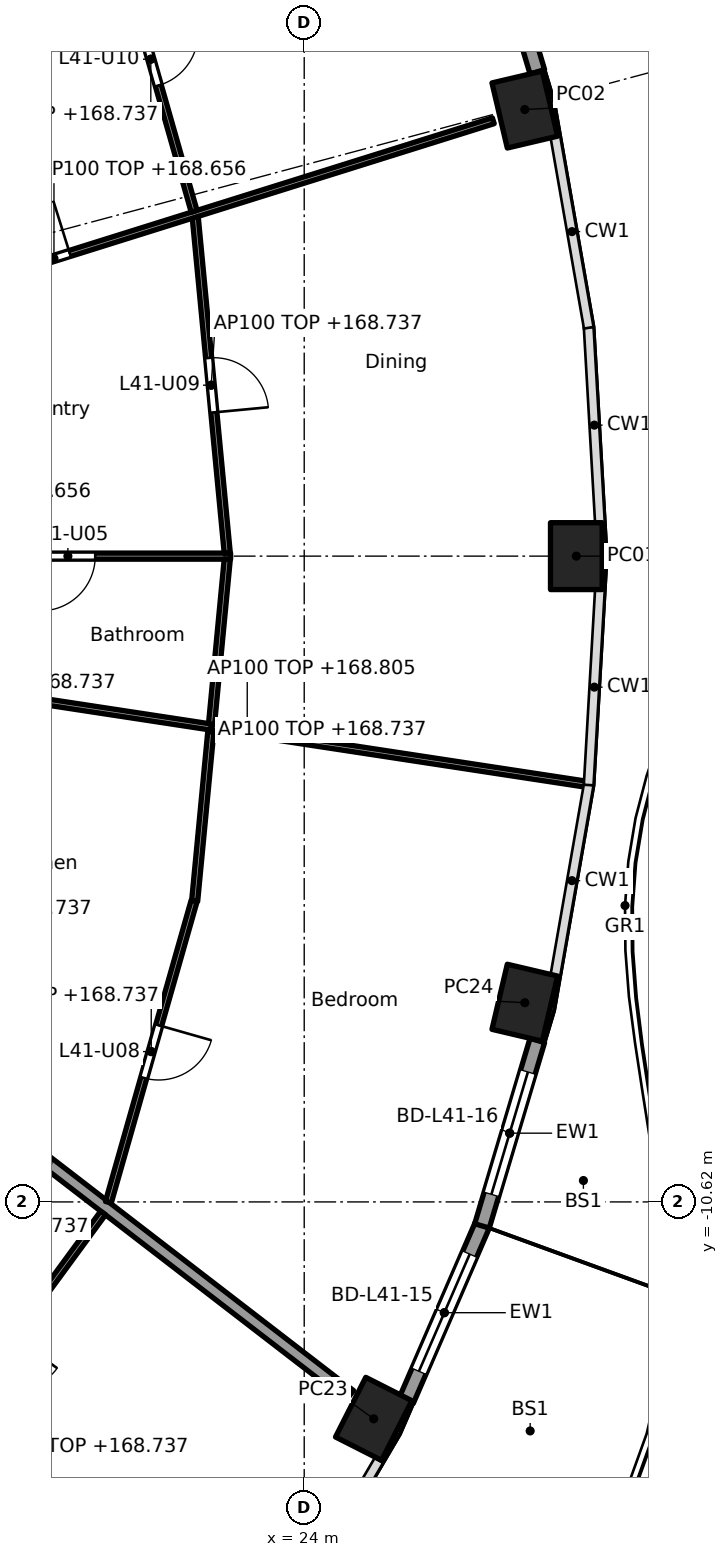
"""IFC4 building model, lengths in metres.
Left out: names, types, materials, properties, quantities, classifications, styles, units other than length and angle.
Written with IfcOpenShell. Run it as: python <this file> out.ifc"""

import sys

from ifc_helpers import new_model, si_unit, direction, frame, frame_2d, origin, origin_2d, place, context, subcontext, project, spatial, rectangle, hollow_rectangle, extrude, element, fill, save


model = new_model("IFC4")
c1 = context("Model", 3, precision=1e-05, world=origin(), true_north=direction((0.0, 1.0)))
c2 = subcontext(c1, "Body", "Model", "MODEL_VIEW")
j1 = project(units=[si_unit("LENGTHUNIT", "METRE"), si_unit("PLANEANGLEUNIT", "RADIAN")], contexts=[c1])
p1 = place(None, origin())
s1 = spatial("IfcSite", under=j1, at=p1, CompositionType="ELEMENT")
p2 = place(p1, origin())
s2 = spatial("IfcBuilding", under=s1, at=p2, CompositionType="ELEMENT")
p3 = place(p2, frame((0.0, 0.0, 165.9)))
s3 = spatial("IfcBuildingStorey", under=s2, at=p3, CompositionType="ELEMENT", Elevation=165.9)
for number, where, z_axis, x_axis in (
    (1, (28.475, 0.0, -0.26), (0.0, 0.0, 1.0), (0.0, 1.0, 0.0)),
    (2, (27.627, 7.344, -0.26), (0.0, 0.0, 1.0), (-0.229, 0.973, 0.0)),
    (3, (25.142, -14.188, -0.26), (0.0, 0.0, 1.0), (0.452, 0.892, 0.0)),
    (4, (27.627, -7.344, -0.26), (0.0, 0.0, 1.0), (0.229, 0.973, 0.0)),
):
    element("IfcColumn", number, at=place(p3, frame(where, z_axis=z_axis, x_axis=x_axis)), inside=s3, PredefinedType="COLUMN", context=c2, shape_type="SweptSolid", body=[
        extrude(hollow_rectangle(XDim=1.1, YDim=0.85, WallThickness=0.036, at=origin_2d()), origin(), (0.0, 0.0, 1.0), 3.96),
    ])
p4 = place(p3, frame((26.924, 11.014, 0.0), z_axis=(0.0, 0.0, 1.0), x_axis=(0.28584838049, -0.958274857946, 0.0)))
e5 = element("IfcWall", 5, at=p4, inside=s3, PredefinedType="SOLIDWALL", context=c2, shape_type="SweptSolid", body=[
    extrude(rectangle(XDim=3.182, YDim=0.25, at=frame_2d((1.591, 0.0))), origin(), (0.0, 0.0, 1.0), 3.44),
])
p5 = place(p4, frame((0.541, 0.0, 0.0)))
e6 = element("IfcOpeningElement", 6, at=p5, cuts=e5, PredefinedType="OPENING", context=c2, shape_type="SweptSolid", body=[
    extrude(rectangle(XDim=2.1, YDim=2.4, at=frame_2d((1.05, 1.2))), frame((0.0, 0.135, 0.0), z_axis=(0.0, -1.0, 0.0), x_axis=(1.0, 0.0, 0.0)), (0.0, 0.0, 1.0), 0.27),
])
p6 = place(p3, frame((26.929, -11.0, 0.0), z_axis=(0.0, 0.0, 1.0), x_axis=(-0.397620521824, -0.917549955384, 0.0)))
e7 = element("IfcWall", 7, at=p6, inside=s3, PredefinedType="SOLIDWALL", context=c2, shape_type="SweptSolid", body=[
    extrude(rectangle(XDim=3.142, YDim=0.25, at=frame_2d((1.571, 0.0))), origin(), (0.0, 0.0, 1.0), 3.44),
])
p7 = place(p6, frame((0.521, 0.0, 0.0)))
e8 = element("IfcOpeningElement", 8, at=p7, cuts=e7, PredefinedType="OPENING", context=c2, shape_type="SweptSolid", body=[
    extrude(rectangle(XDim=2.1, YDim=2.4, at=frame_2d((1.05, 1.2))), frame((0.0, 0.135, 0.0), z_axis=(0.0, -1.0, 0.0), x_axis=(1.0, 0.0, 0.0)), (0.0, 0.0, 1.0), 0.27),
])
p8 = place(p3, frame((27.833, -7.965, 0.0), z_axis=(0.0, 0.0, 1.0), x_axis=(-0.28584838049, -0.958274857946, 0.0)))
e9 = element("IfcWall", 9, at=p8, inside=s3, PredefinedType="SOLIDWALL", context=c2, shape_type="SweptSolid", body=[
    extrude(rectangle(XDim=3.182, YDim=0.25, at=frame_2d((1.591, 0.0))), origin(), (0.0, 0.0, 1.0), 3.44),
])
p9 = place(p8, frame((0.541, 0.0, 0.0)))
e10 = element("IfcOpeningElement", 10, at=p9, cuts=e9, PredefinedType="OPENING", context=c2, shape_type="SweptSolid", body=[
    extrude(rectangle(XDim=2.1, YDim=2.4, at=frame_2d((1.05, 1.2))), frame((0.0, 0.135, 0.0), z_axis=(0.0, -1.0, 0.0), x_axis=(1.0, 0.0, 0.0)), (0.0, 0.0, 1.0), 0.27),
])
p10 = place(p3, frame((14.822, -6.154, 0.0), z_axis=(0.0, 0.0, 1.0), x_axis=(0.792203056092, -0.610257583254, 0.0)))
e11 = element("IfcWall", 11, at=p10, inside=s3, PredefinedType="PARTITIONING", context=c2, shape_type="SweptSolid", body=[
    extrude(rectangle(XDim=12.533, YDim=0.2, at=frame_2d((6.266, 0.0))), origin(), (0.0, 0.0, 1.0), 2.837),
])
p11 = place(p3, frame((12.665, 0.0, 0.0), z_axis=(0.0, 0.0, 1.0), x_axis=(1.0, 0.0, 0.0)))
e12 = element("IfcWall", 12, at=p11, inside=s3, PredefinedType="PARTITIONING", context=c2, shape_type="SweptSolid", body=[
    extrude(rectangle(XDim=10.124, YDim=0.1, at=frame_2d((5.062, 0.0))), origin(), (0.0, 0.0, 1.0), 2.756),
])
p12 = place(p11, frame((1.961, 0.0, 0.0)))
e13 = element("IfcOpeningElement", 13, at=p12, cuts=e12, PredefinedType="OPENING", context=c2, shape_type="SweptSolid", body=[
    extrude(rectangle(XDim=0.9, YDim=2.1, at=frame_2d((0.45, 1.05))), frame((0.0, 0.06, 0.0), z_axis=(0.0, -1.0, 0.0), x_axis=(1.0, 0.0, 0.0)), (0.0, 0.0, 1.0), 0.12),
])
p13 = place(p11, frame((6.999, 0.0, 0.0)))
e14 = element("IfcOpeningElement", 14, at=p13, cuts=e12, PredefinedType="OPENING", context=c2, shape_type="SweptSolid", body=[
    extrude(rectangle(XDim=0.9, YDim=2.1, at=frame_2d((0.45, 1.05))), frame((0.0, 0.06, 0.0), z_axis=(0.0, -1.0, 0.0), x_axis=(1.0, 0.0, 0.0)), (0.0, 0.0, 1.0), 0.12),
])
p14 = place(p3, frame((22.734, 0.05, 0.0), z_axis=(0.0, 0.0, 1.0), x_axis=(-0.094923312677, 0.995484587882, 0.0)))
e15 = element("IfcWall", 15, at=p14, inside=s3, PredefinedType="PARTITIONING", context=c2, shape_type="SweptSolid", body=[
    extrude(rectangle(XDim=5.548, YDim=0.1, at=frame_2d((2.774, 0.0))), origin(), (0.0, 0.0, 1.0), 2.837),
])
p15 = place(p14, frame((2.324, 0.0, 0.0)))
e16 = element("IfcOpeningElement", 16, at=p15, cuts=e15, PredefinedType="OPENING", context=c2, shape_type="SweptSolid", body=[
    extrude(rectangle(XDim=0.9, YDim=2.1, at=frame_2d((0.45, 1.05))), frame((0.0, 0.06, 0.0), z_axis=(0.0, -1.0, 0.0), x_axis=(1.0, 0.0, 0.0)), (0.0, 0.0, 1.0), 0.12),
])
p16 = place(p3, frame((22.734, -0.05, 0.0), z_axis=(0.0, 0.0, 1.0), x_axis=(-0.0949274088, -0.995484197292, 0.0)))
e17 = element("IfcWall", 17, at=p16, inside=s3, PredefinedType="PARTITIONING", context=c2, shape_type="SweptSolid", body=[
    extrude(rectangle(XDim=5.648, YDim=0.1, at=frame_2d((2.824, 0.0))), origin(), (0.0, 0.0, 1.0), 2.837),
])
p17 = place(p3, frame((12.66, 2.632, 0.0), z_axis=(0.0, 0.0, 1.0), x_axis=(0.954248738607, 0.299013954302, 0.0)))
e18 = element("IfcWall", 18, at=p17, inside=s3, PredefinedType="PARTITIONING", context=c2, shape_type="SweptSolid", body=[
    extrude(rectangle(XDim=15.142, YDim=0.1, at=frame_2d((7.571, 0.0))), origin(), (0.0, 0.0, 1.0), 2.756),
])
p18 = place(p17, frame((0.669, 0.0, 0.0)))
e19 = element("IfcOpeningElement", 19, at=p18, cuts=e18, PredefinedType="OPENING", context=c2, shape_type="SweptSolid", body=[
    extrude(rectangle(XDim=0.9, YDim=2.1, at=frame_2d((0.45, 1.05))), frame((0.0, 0.06, 0.0), z_axis=(0.0, -1.0, 0.0), x_axis=(1.0, 0.0, 0.0)), (0.0, 0.0, 1.0), 0.12),
])
p19 = place(p17, frame((6.944, 0.0, 0.0)))
e20 = element("IfcOpeningElement", 20, at=p19, cuts=e18, PredefinedType="OPENING", context=c2, shape_type="SweptSolid", body=[
    extrude(rectangle(XDim=0.9, YDim=2.1, at=frame_2d((0.45, 1.05))), frame((0.0, 0.06, 0.0), z_axis=(0.0, -1.0, 0.0), x_axis=(1.0, 0.0, 0.0)), (0.0, 0.0, 1.0), 0.12),
])
p20 = place(p3, frame((22.189, 5.67, 0.0), z_axis=(0.0, 0.0, 1.0), x_axis=(-0.273815967041, 0.961782104322, 0.0)))
e21 = element("IfcWall", 21, at=p20, inside=s3, PredefinedType="PARTITIONING", context=c2, shape_type="SweptSolid", body=[
    extrude(rectangle(XDim=5.202, YDim=0.1, at=frame_2d((2.601, 0.0))), origin(), (0.0, 0.0, 1.0), 2.837),
])
p21 = place(p20, frame((2.151, 0.0, 0.0)))
e22 = element("IfcOpeningElement", 22, at=p21, cuts=e21, PredefinedType="OPENING", context=c2, shape_type="SweptSolid", body=[
    extrude(rectangle(XDim=0.9, YDim=2.1, at=frame_2d((0.45, 1.05))), frame((0.0, 0.06, 0.0), z_axis=(0.0, -1.0, 0.0), x_axis=(1.0, 0.0, 0.0)), (0.0, 0.0, 1.0), 0.12),
])
p22 = place(p3, frame((17.169, -15.609, 0.0), z_axis=(0.0, 0.0, 1.0), x_axis=(0.591122127251, 0.806582066918, 0.0)))
e23 = element("IfcWall", 23, at=p22, inside=s3, PredefinedType="PARTITIONING", context=c2, shape_type="SweptSolid", body=[
    extrude(rectangle(XDim=5.96, YDim=0.1, at=frame_2d((2.98, 0.0))), origin(), (0.0, 0.0, 1.0), 2.837),
])
p23 = place(p22, frame((2.555, 0.0, 0.0)))
e24 = element("IfcOpeningElement", 24, at=p23, cuts=e23, PredefinedType="OPENING", context=c2, shape_type="SweptSolid", body=[
    extrude(rectangle(XDim=0.9, YDim=2.1, at=frame_2d((0.45, 1.05))), frame((0.0, 0.06, 0.0), z_axis=(0.0, -1.0, 0.0), x_axis=(1.0, 0.0, 0.0)), (0.0, 0.0, 1.0), 0.12),
])
p24 = place(p3, frame((20.779, -10.625, 0.0), z_axis=(0.0, 0.0, 1.0), x_axis=(0.273819702124, 0.961781040949, 0.0)))
e25 = element("IfcWall", 25, at=p24, inside=s3, PredefinedType="PARTITIONING", context=c2, shape_type="SweptSolid", body=[
    extrude(rectangle(XDim=5.152, YDim=0.1, at=frame_2d((2.576, 0.0))), origin(), (0.0, 0.0, 1.0), 2.837),
])
p25 = place(p24, frame((2.126, 0.0, 0.0)))
e26 = element("IfcOpeningElement", 26, at=p25, cuts=e25, PredefinedType="OPENING", context=c2, shape_type="SweptSolid", body=[
    extrude(rectangle(XDim=0.9, YDim=2.1, at=frame_2d((0.45, 1.05))), frame((0.0, 0.06, 0.0), z_axis=(0.0, -1.0, 0.0), x_axis=(1.0, 0.0, 0.0)), (0.0, 0.0, 1.0), 0.12),
])
p26 = place(p3, frame((17.407, -2.039, 0.0), z_axis=(0.0, 0.0, 1.0), x_axis=(0.98858728603, -0.150649188184, 0.0)))
e27 = element("IfcWall", 27, at=p26, inside=s3, PredefinedType="PARTITIONING", context=c2, shape_type="SweptSolid", body=[
    extrude(rectangle(XDim=11.441, YDim=0.1, at=frame_2d((5.721, 0.0))), origin(), (0.0, 0.0, 1.0), 2.905),
])
p27 = place(p7, origin())
e28 = element("IfcDoor", 28, at=p27, inside=s3, OperationType="SLIDING_TO_LEFT", PredefinedType="DOOR", context=c2, shape_type="SweptSolid", body=[
    extrude(rectangle(XDim=2.1, YDim=2.4, at=frame_2d((1.05, 1.2))), frame((0.0, 0.025, 0.0), z_axis=(0.0, -1.0, 0.0), x_axis=(1.0, 0.0, 0.0)), (0.0, 0.0, 1.0), 0.05),
])
fill(e8, e28)
p28 = place(p9, origin())
e29 = element("IfcDoor", 29, at=p28, inside=s3, OperationType="SLIDING_TO_LEFT", PredefinedType="DOOR", context=c2, shape_type="SweptSolid", body=[
    extrude(rectangle(XDim=2.1, YDim=2.4, at=frame_2d((1.05, 1.2))), frame((0.0, 0.025, 0.0), z_axis=(0.0, -1.0, 0.0), x_axis=(1.0, 0.0, 0.0)), (0.0, 0.0, 1.0), 0.05),
])
fill(e10, e29)
p29 = place(p13, frame((0.9, 0.0, 0.0), x_axis=(-1.0, 0.0, 0.0)))
e30 = element("IfcDoor", 30, at=p29, inside=s3, OperationType="SINGLE_SWING_RIGHT", PredefinedType="DOOR", context=c2, shape_type="SweptSolid", body=[
    extrude(rectangle(XDim=0.9, YDim=2.1, at=frame_2d((0.45, 1.05))), frame((0.0, 0.025, 0.0), z_axis=(0.0, -1.0, 0.0), x_axis=(1.0, 0.0, 0.0)), (0.0, 0.0, 1.0), 0.05),
])
fill(e14, e30)
p30 = place(p19, origin())
e31 = element("IfcDoor", 31, at=p30, inside=s3, OperationType="SINGLE_SWING_RIGHT", PredefinedType="DOOR", context=c2, shape_type="SweptSolid", body=[
    extrude(rectangle(XDim=0.9, YDim=2.1, at=frame_2d((0.45, 1.05))), frame((0.0, 0.025, 0.0), z_axis=(0.0, -1.0, 0.0), x_axis=(1.0, 0.0, 0.0)), (0.0, 0.0, 1.0), 0.05),
])
fill(e20, e31)
p31 = place(p25, frame((0.9, 0.0, 0.0), x_axis=(-1.0, 0.0, 0.0)))
e32 = element("IfcDoor", 32, at=p31, inside=s3, OperationType="SINGLE_SWING_LEFT", PredefinedType="DOOR", context=c2, shape_type="SweptSolid", body=[
    extrude(rectangle(XDim=0.9, YDim=2.1, at=frame_2d((0.45, 1.05))), frame((0.0, 0.025, 0.0), z_axis=(0.0, -1.0, 0.0), x_axis=(1.0, 0.0, 0.0)), (0.0, 0.0, 1.0), 0.05),
])
fill(e26, e32)
p32 = place(p15, frame((0.9, 0.0, 0.0), x_axis=(-1.0, 0.0, 0.0)))
e33 = element("IfcDoor", 33, at=p32, inside=s3, OperationType="SINGLE_SWING_RIGHT", PredefinedType="DOOR", context=c2, shape_type="SweptSolid", body=[
    extrude(rectangle(XDim=0.9, YDim=2.1, at=frame_2d((0.45, 1.05))), frame((0.0, 0.025, 0.0), z_axis=(0.0, -1.0, 0.0), x_axis=(1.0, 0.0, 0.0)), (0.0, 0.0, 1.0), 0.05),
])
fill(e16, e33)
p33 = place(p21, frame((0.9, 0.0, 0.0), x_axis=(-1.0, 0.0, 0.0)))
e34 = element("IfcDoor", 34, at=p33, inside=s3, OperationType="SINGLE_SWING_LEFT", PredefinedType="DOOR", context=c2, shape_type="SweptSolid", body=[
    extrude(rectangle(XDim=0.9, YDim=2.1, at=frame_2d((0.45, 1.05))), frame((0.0, 0.025, 0.0), z_axis=(0.0, -1.0, 0.0), x_axis=(1.0, 0.0, 0.0)), (0.0, 0.0, 1.0), 0.05),
])
fill(e22, e34)
save(model, sys.argv[1])
